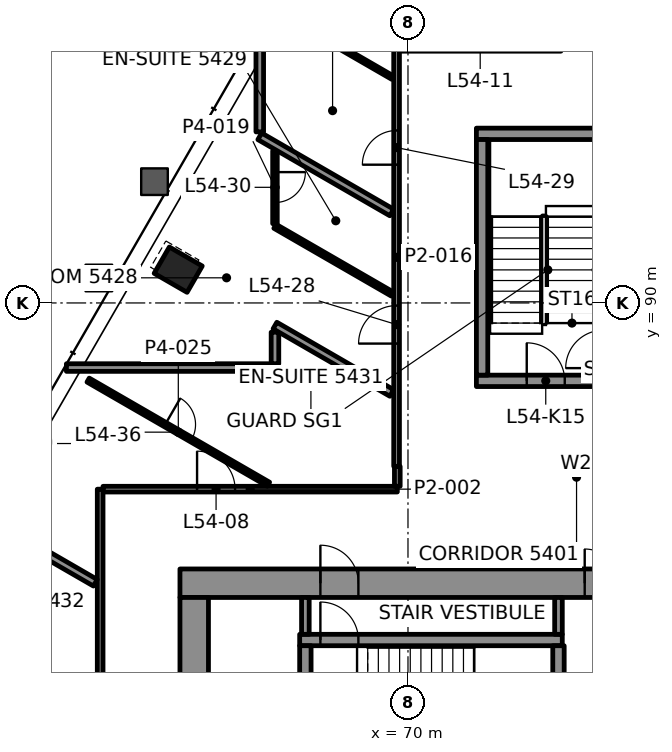
"""IFC4 building model, lengths in metres.
Left out: names, types, materials, properties, quantities, classifications, styles, units other than length and angle.
Written with IfcOpenShell. Run it as: python <this file> out.ifc"""

import sys

from ifc_helpers import new_model, si_unit, direction, frame, frame_2d, origin, origin_2d, place, context, subcontext, project, spatial, rectangle, hollow_rectangle, extrude, element, fill, save


model = new_model("IFC4")
c1 = context("Model", 3, precision=1e-05, world=origin(), true_north=direction((0.0, 1.0)))
c2 = subcontext(c1, "Body", "Model", "MODEL_VIEW")
j1 = project(units=[si_unit("LENGTHUNIT", "METRE"), si_unit("PLANEANGLEUNIT", "RADIAN")], contexts=[c1])
p1 = place(None, origin())
s1 = spatial("IfcSite", under=j1, at=p1, CompositionType="ELEMENT")
p2 = place(p1, origin())
s2 = spatial("IfcBuilding", under=s1, at=p2, CompositionType="ELEMENT")
p3 = place(p2, frame((0.0, 0.0, 229.9)))
s3 = spatial("IfcBuildingStorey", under=s2, at=p3, CompositionType="ELEMENT", Elevation=229.9)
p4 = place(p3, frame((63.954, 90.875, -0.0), z_axis=(0.0, 0.0, 1.0), x_axis=(-0.5, -0.866025403784, 0.0)))
e1 = element("IfcColumn", 1, at=p4, inside=s3, PredefinedType="COLUMN", context=c2, shape_type="SweptSolid", body=[
    extrude(hollow_rectangle(XDim=0.8, YDim=1.0, WallThickness=0.05, at=origin_2d()), origin(), (0.0, 0.0, 1.0), 3.9),
])
p5 = place(p3, frame((64.0, 82.625, 0.0), z_axis=(0.0, 0.0, 1.0), x_axis=(1.0, 0.0, 0.0)))
e2 = element("IfcWall", 2, at=p5, inside=s3, PredefinedType="SHEAR", context=c2, shape_type="SweptSolid", body=[
    extrude(rectangle(XDim=22.0, YDim=0.75, at=frame_2d((11.0, 0.0))), origin(), (0.0, 0.0, 1.0), 3.7),
])
p6 = place(p5, frame((3.695, 0.0, 0.0)))
e3 = element("IfcOpeningElement", 3, at=p6, cuts=e2, PredefinedType="OPENING", context=c2, shape_type="SweptSolid", body=[
    extrude(rectangle(XDim=1.0, YDim=2.1, at=frame_2d((0.5, 1.05))), frame((0.0, 0.385, 0.0), z_axis=(0.0, -1.0, 0.0), x_axis=(1.0, 0.0, 0.0)), (0.0, 0.0, 1.0), 0.77),
])
p7 = place(p5, frame((17.505, 0.0, 0.0)))
e4 = element("IfcOpeningElement", 4, at=p7, cuts=e2, PredefinedType="OPENING", context=c2, shape_type="SweptSolid", body=[
    extrude(rectangle(XDim=1.0, YDim=2.1, at=frame_2d((0.5, 1.05))), frame((0.0, 0.385, 0.0), z_axis=(0.0, -1.0, 0.0), x_axis=(1.0, 0.0, 0.0)), (0.0, 0.0, 1.0), 0.77),
])
p8 = place(p5, frame((10.65, 0.0, 0.0)))
e5 = element("IfcOpeningElement", 5, at=p8, cuts=e2, PredefinedType="OPENING", context=c2, shape_type="SweptSolid", body=[
    extrude(rectangle(XDim=0.9, YDim=2.1, at=frame_2d((0.45, 1.05))), frame((0.0, 0.385, 0.0), z_axis=(0.0, -1.0, 0.0), x_axis=(1.0, 0.0, 0.0)), (0.0, 0.0, 1.0), 0.77),
])
p9 = place(p3, frame((64.375, 67.75, 0.0), z_axis=(0.0, 0.0, 1.0), x_axis=(0.0, 1.0, 0.0)))
e6 = element("IfcWall", 6, at=p9, inside=s3, PredefinedType="SHEAR", context=c2, shape_type="SweptSolid", body=[
    extrude(rectangle(XDim=14.5, YDim=0.75, at=frame_2d((7.25, 0.0))), origin(), (0.0, 0.0, 1.0), 3.7),
])
p10 = place(p9, frame((4.65, 0.0, 0.0)))
e7 = element("IfcOpeningElement", 7, at=p10, cuts=e6, PredefinedType="OPENING", context=c2, shape_type="SweptSolid", body=[
    extrude(rectangle(XDim=1.8, YDim=2.1, at=frame_2d((0.9, 1.05))), frame((0.0, 0.385, 0.0), z_axis=(0.0, -1.0, 0.0), x_axis=(1.0, 0.0, 0.0)), (0.0, 0.0, 1.0), 0.77),
])
p11 = place(p9, frame((2.55, 0.0, 0.0)))
e8 = element("IfcOpeningElement", 8, at=p11, cuts=e6, PredefinedType="OPENING", context=c2, shape_type="SweptSolid", body=[
    extrude(rectangle(XDim=0.9, YDim=2.1, at=frame_2d((0.45, 1.05))), frame((0.0, 0.385, 0.0), z_axis=(0.0, -1.0, 0.0), x_axis=(1.0, 0.0, 0.0)), (0.0, 0.0, 1.0), 0.77),
])
p12 = place(p9, frame((10.35, 0.0, 0.0)))
e9 = element("IfcOpeningElement", 9, at=p12, cuts=e6, PredefinedType="OPENING", context=c2, shape_type="SweptSolid", body=[
    extrude(rectangle(XDim=0.9, YDim=2.1, at=frame_2d((0.45, 1.05))), frame((0.0, 0.385, 0.0), z_axis=(0.0, -1.0, 0.0), x_axis=(1.0, 0.0, 0.0)), (0.0, 0.0, 1.0), 0.77),
])
p13 = place(p3, frame((67.15, 81.13, 0.0), z_axis=(0.0, 0.0, 1.0), x_axis=(1.0, 0.0, 0.0)))
e10 = element("IfcWall", 10, at=p13, inside=s3, PredefinedType="SHEAR", context=c2, shape_type="SweptSolid", body=[
    extrude(rectangle(XDim=6.91, YDim=0.3, at=frame_2d((3.455, 0.0))), origin(), (0.0, 0.0, 1.0), 3.7),
])
p14 = place(p13, frame((0.545, 0.0, 0.0)))
e11 = element("IfcOpeningElement", 11, at=p14, cuts=e10, PredefinedType="OPENING", context=c2, shape_type="SweptSolid", body=[
    extrude(rectangle(XDim=1.0, YDim=2.1, at=frame_2d((0.5, 1.05))), frame((0.0, 0.16, 0.0), z_axis=(0.0, -1.0, 0.0), x_axis=(1.0, 0.0, 0.0)), (0.0, 0.0, 1.0), 0.32),
])
for number, where, z_axis, x_axis in (
    (12, (67.3, 77.9, 0.0), (0.0, 0.0, 1.0), (0.0, 1.0, 0.0)),
    (13, (73.96, 77.9, 0.0), (0.0, 0.0, 1.0), (0.0, 1.0, 0.0)),
):
    element("IfcWall", number, at=place(p3, frame(where, z_axis=z_axis, x_axis=x_axis)), inside=s3, PredefinedType="SHEAR", context=c2, shape_type="SweptSolid", body=[
        extrude(rectangle(XDim=3.08, YDim=0.3, at=frame_2d((1.54, 0.0))), origin(), (0.0, 0.0, 1.0), 3.7),
    ])
p15 = place(p3, frame((71.8, 87.95, 0.0), z_axis=(0.0, 0.0, 1.0), x_axis=(1.0, 0.0, 0.0)))
e14 = element("IfcWall", 14, at=p15, inside=s3, PredefinedType="SHEAR", context=c2, shape_type="SweptSolid", body=[
    extrude(rectangle(XDim=6.4, YDim=0.3, at=frame_2d((3.2, 0.0))), origin(), (0.0, 0.0, 1.0), 3.7),
])
p16 = place(p15, frame((1.325, 0.0, 0.0)))
e15 = element("IfcOpeningElement", 15, at=p16, cuts=e14, PredefinedType="OPENING", context=c2, shape_type="SweptSolid", body=[
    extrude(rectangle(XDim=1.0, YDim=2.1, at=frame_2d((0.5, 1.05))), frame((0.0, 0.16, 0.0), z_axis=(0.0, -1.0, 0.0), x_axis=(1.0, 0.0, 0.0)), (0.0, 0.0, 1.0), 0.32),
])
p17 = place(p15, frame((4.125, 0.0, 0.0)))
e16 = element("IfcOpeningElement", 16, at=p17, cuts=e14, PredefinedType="OPENING", context=c2, shape_type="SweptSolid", body=[
    extrude(rectangle(XDim=1.2, YDim=2.1, at=frame_2d((0.6, 1.05))), frame((0.0, 0.16, 0.0), z_axis=(0.0, -1.0, 0.0), x_axis=(1.0, 0.0, 0.0)), (0.0, 0.0, 1.0), 0.32),
])
p18 = place(p3, frame((71.8, 94.45, 0.0), z_axis=(0.0, 0.0, 1.0), x_axis=(1.0, 0.0, 0.0)))
e17 = element("IfcWall", 17, at=p18, inside=s3, PredefinedType="SHEAR", context=c2, shape_type="SweptSolid", body=[
    extrude(rectangle(XDim=6.4, YDim=0.3, at=frame_2d((3.2, 0.0))), origin(), (0.0, 0.0, 1.0), 3.7),
])
p19 = place(p3, frame((71.95, 88.1, 0.0), z_axis=(0.0, 0.0, 1.0), x_axis=(0.0, 1.0, 0.0)))
e18 = element("IfcWall", 18, at=p19, inside=s3, PredefinedType="SHEAR", context=c2, shape_type="SweptSolid", body=[
    extrude(rectangle(XDim=6.2, YDim=0.3, at=frame_2d((3.1, 0.0))), origin(), (0.0, 0.0, 1.0), 3.7),
])
p20 = place(p3, frame((61.976, 85.1, 0.0), z_axis=(0.0, 0.0, 1.0), x_axis=(1.0, 0.0, 0.0)))
e19 = element("IfcWall", 19, at=p20, inside=s3, PredefinedType="PARTITIONING", context=c2, shape_type="SweptSolid", body=[
    extrude(rectangle(XDim=7.744, YDim=0.15, at=frame_2d((3.872, 0.0))), origin(), (0.0, 0.0, 1.0), 3.1),
])
p21 = place(p20, frame((2.475, 0.0, 0.0)))
e20 = element("IfcOpeningElement", 20, at=p21, cuts=e19, PredefinedType="OPENING", context=c2, shape_type="SweptSolid", body=[
    extrude(rectangle(XDim=1.0, YDim=2.1, at=frame_2d((0.5, 1.05))), frame((0.0, 0.085, 0.0), z_axis=(0.0, -1.0, 0.0), x_axis=(1.0, 0.0, 0.0)), (0.0, 0.0, 1.0), 0.17),
])
p22 = place(p3, frame((61.012, 88.3, 0.0), z_axis=(0.0, 0.0, 1.0), x_axis=(1.0, 0.0, 0.0)))
e21 = element("IfcWall", 21, at=p22, inside=s3, PredefinedType="PARTITIONING", context=c2, shape_type="SweptSolid", body=[
    extrude(rectangle(XDim=5.488, YDim=0.2, at=frame_2d((2.744, 0.0))), origin(), (0.0, 0.0, 1.0), 3.022),
])
p23 = place(p3, frame((69.719, 85.175, 0.0), z_axis=(0.0, 0.0, 1.0), x_axis=(0.0, 1.0, 0.0)))
e22 = element("IfcWall", 22, at=p23, inside=s3, PredefinedType="PARTITIONING", context=c2, shape_type="SweptSolid", body=[
    extrude(rectangle(XDim=0.525, YDim=0.15, at=frame_2d((0.262, 0.0))), origin(), (0.0, 0.0, 1.0), 3.1),
])
p24 = place(p3, frame((69.7, 85.7, 0.0), z_axis=(0.0, 0.0, 1.0), x_axis=(0.0, 1.0, 0.0)))
e23 = element("IfcWall", 23, at=p24, inside=s3, PredefinedType="PARTITIONING", context=c2, shape_type="SweptSolid", body=[
    extrude(rectangle(XDim=10.999, YDim=0.15, at=frame_2d((5.5, 0.0))), origin(), (0.0, 0.0, 1.0), 3.1),
])
p25 = place(p24, frame((3.23, 0.0, 0.0)))
e24 = element("IfcOpeningElement", 24, at=p25, cuts=e23, PredefinedType="OPENING", context=c2, shape_type="SweptSolid", body=[
    extrude(rectangle(XDim=1.0, YDim=2.1, at=frame_2d((0.5, 1.05))), frame((0.0, 0.085, 0.0), z_axis=(0.0, -1.0, 0.0), x_axis=(1.0, 0.0, 0.0)), (0.0, 0.0, 1.0), 0.17),
])
p26 = place(p24, frame((7.938, 0.0, 0.0)))
e25 = element("IfcOpeningElement", 25, at=p26, cuts=e23, PredefinedType="OPENING", context=c2, shape_type="SweptSolid", body=[
    extrude(rectangle(XDim=0.9, YDim=2.1, at=frame_2d((0.45, 1.05))), frame((0.0, 0.085, 0.0), z_axis=(0.0, -1.0, 0.0), x_axis=(1.0, 0.0, 0.0)), (0.0, 0.0, 1.0), 0.17),
])
p27 = place(p3, frame((66.5, 88.4, 0.0), z_axis=(0.0, 0.0, 1.0), x_axis=(0.0, 1.0, 0.0)))
e26 = element("IfcWall", 26, at=p27, inside=s3, PredefinedType="PARTITIONING", context=c2, shape_type="SweptSolid", body=[
    extrude(rectangle(XDim=0.83, YDim=0.2, at=frame_2d((0.415, 0.0))), origin(), (0.0, 0.0, 1.0), 3.1),
])
p28 = place(p3, frame((66.5, 93.999, 0.0), z_axis=(0.0, 0.0, 1.0), x_axis=(0.0, -1.0, 0.0)))
e27 = element("IfcWall", 27, at=p28, inside=s3, PredefinedType="PARTITIONING", context=c2, shape_type="SweptSolid", body=[
    extrude(rectangle(XDim=1.912, YDim=0.12, at=frame_2d((0.956, 0.0))), origin(), (0.0, 0.0, 1.0), 3.1),
])
p29 = place(p28, frame((0.556, 0.0, 0.0)))
e28 = element("IfcOpeningElement", 28, at=p29, cuts=e27, PredefinedType="OPENING", context=c2, shape_type="SweptSolid", body=[
    extrude(rectangle(XDim=0.8, YDim=2.1, at=frame_2d((0.4, 1.05))), frame((0.0, 0.07, 0.0), z_axis=(0.0, -1.0, 0.0), x_axis=(1.0, 0.0, 0.0)), (0.0, 0.0, 1.0), 0.14),
])
p30 = place(p3, frame((66.1, 94.502, 0.0), z_axis=(0.0, 0.0, 1.0), x_axis=(0.0, 1.0, 0.0)))
e29 = element("IfcWall", 29, at=p30, inside=s3, PredefinedType="PARTITIONING", context=c2, shape_type="SweptSolid", body=[
    extrude(rectangle(XDim=2.611, YDim=0.2, at=frame_2d((1.306, 0.0))), origin(), (0.0, 0.0, 1.0), 3.022),
])
p31 = place(p3, frame((61.9, 68.476, 0.0), z_axis=(0.0, 0.0, 1.0), x_axis=(0.0, 1.0, 0.0)))
e30 = element("IfcWall", 30, at=p31, inside=s3, PredefinedType="PARTITIONING", context=c2, shape_type="SweptSolid", body=[
    extrude(rectangle(XDim=16.624, YDim=0.15, at=frame_2d((8.312, 0.0))), origin(), (0.0, 0.0, 1.0), 3.1),
])
p32 = place(p31, frame((1.946, 0.0, 0.0)))
e31 = element("IfcOpeningElement", 31, at=p32, cuts=e30, PredefinedType="OPENING", context=c2, shape_type="SweptSolid", body=[
    extrude(rectangle(XDim=0.9, YDim=2.1, at=frame_2d((0.45, 1.05))), frame((0.0, 0.085, 0.0), z_axis=(0.0, -1.0, 0.0), x_axis=(1.0, 0.0, 0.0)), (0.0, 0.0, 1.0), 0.17),
])
p33 = place(p31, frame((10.263, 0.0, 0.0)))
e32 = element("IfcOpeningElement", 32, at=p33, cuts=e30, PredefinedType="OPENING", context=c2, shape_type="SweptSolid", body=[
    extrude(rectangle(XDim=1.0, YDim=2.1, at=frame_2d((0.5, 1.05))), frame((0.0, 0.085, 0.0), z_axis=(0.0, -1.0, 0.0), x_axis=(1.0, 0.0, 0.0)), (0.0, 0.0, 1.0), 0.17),
])
p34 = place(p3, frame((69.599, 95.927, 0.0), z_axis=(0.0, 0.0, 1.0), x_axis=(-0.866028486751, 0.499994660107, 0.0)))
e33 = element("IfcWall", 33, at=p34, inside=s3, PredefinedType="PARTITIONING", context=c2, shape_type="SweptSolid", body=[
    extrude(rectangle(XDim=3.623, YDim=0.1, at=frame_2d((1.812, 0.0))), origin(), (0.0, 0.0, 1.0), 3.022),
])
p35 = place(p3, frame((69.573, 92.38, 0.0), z_axis=(0.0, 0.0, 1.0), x_axis=(-0.866020331166, 0.500008785931, 0.0)))
e34 = element("IfcWall", 34, at=p35, inside=s3, PredefinedType="PARTITIONING", context=c2, shape_type="SweptSolid", body=[
    extrude(rectangle(XDim=4.01, YDim=0.2, at=frame_2d((2.005, 0.0))), origin(), (0.0, 0.0, 1.0), 3.022),
])
p36 = place(p3, frame((69.59, 90.233, 0.0), z_axis=(0.0, 0.0, 1.0), x_axis=(-0.866028357664, 0.499994883695, 0.0)))
e35 = element("IfcWall", 35, at=p36, inside=s3, PredefinedType="PARTITIONING", context=c2, shape_type="SweptSolid", body=[
    extrude(rectangle(XDim=3.568, YDim=0.12, at=frame_2d((1.784, 0.0))), origin(), (0.0, 0.0, 1.0), 3.1),
])
p37 = place(p3, frame((69.573, 87.631, 0.0), z_axis=(0.0, 0.0, 1.0), x_axis=(-0.866028616566, 0.499994435258, 0.0)))
e36 = element("IfcWall", 36, at=p37, inside=s3, PredefinedType="PARTITIONING", context=c2, shape_type="SweptSolid", body=[
    extrude(rectangle(XDim=3.548, YDim=0.2, at=frame_2d((1.774, 0.0))), origin(), (0.0, 0.0, 1.0), 3.1),
])
p38 = place(p3, frame((61.583, 87.97, 0.0), z_axis=(0.0, 0.0, 1.0), x_axis=(0.866027562125, -0.499996261625, 0.0)))
e37 = element("IfcWall", 37, at=p38, inside=s3, PredefinedType="PARTITIONING", context=c2, shape_type="SweptSolid", body=[
    extrude(rectangle(XDim=5.48, YDim=0.12, at=frame_2d((2.74, 0.0))), origin(), (0.0, 0.0, 1.0), 3.022),
])
p39 = place(p38, frame((2.34, 0.0, 0.0)))
e38 = element("IfcOpeningElement", 38, at=p39, cuts=e37, PredefinedType="OPENING", context=c2, shape_type="SweptSolid", body=[
    extrude(rectangle(XDim=0.8, YDim=2.1, at=frame_2d((0.4, 1.05))), frame((0.0, 0.07, 0.0), z_axis=(0.0, -1.0, 0.0), x_axis=(1.0, 0.0, 0.0)), (0.0, 0.0, 1.0), 0.14),
])
p40 = place(p3, frame((61.773, 82.637, 0.0), z_axis=(0.0, 0.0, 1.0), x_axis=(-0.866082241464, 0.499901541327, 0.0)))
e39 = element("IfcWall", 39, at=p40, inside=s3, PredefinedType="PARTITIONING", context=c2, shape_type="SweptSolid", body=[
    extrude(rectangle(XDim=1.731, YDim=0.2, at=frame_2d((0.865, 0.0))), origin(), (0.0, 0.0, 1.0), 3.1),
])
for number, where, z_axis, x_axis in (
    (40, (67.3, 81.28, 0.0), (0.0, 0.0, 1.0), (0.0, 1.0, 0.0)),
    (41, (73.96, 81.28, 0.0), (0.0, 0.0, 1.0), (0.0, 1.0, 0.0)),
):
    element("IfcWall", number, at=place(p3, frame(where, z_axis=z_axis, x_axis=x_axis)), inside=s3, PredefinedType="PARTITIONING", context=c2, shape_type="SweptSolid", body=[
        extrude(rectangle(XDim=0.97, YDim=0.2, at=frame_2d((0.485, 0.0))), origin(), (0.0, 0.0, 1.0), 3.7),
    ])
p41 = place(p21, origin())
e42 = element("IfcDoor", 42, at=p41, inside=s3, OperationType="SINGLE_SWING_LEFT", PredefinedType="DOOR", context=c2, shape_type="SweptSolid", body=[
    extrude(rectangle(XDim=1.0, YDim=2.1, at=frame_2d((0.5, 1.05))), frame((0.0, 0.025, 0.0), z_axis=(0.0, -1.0, 0.0), x_axis=(1.0, 0.0, 0.0)), (0.0, 0.0, 1.0), 0.05),
])
fill(e20, e42)
p42 = place(p25, origin())
e43 = element("IfcDoor", 43, at=p42, inside=s3, OperationType="SINGLE_SWING_LEFT", PredefinedType="DOOR", context=c2, shape_type="SweptSolid", body=[
    extrude(rectangle(XDim=1.0, YDim=2.1, at=frame_2d((0.5, 1.05))), frame((0.0, 0.025, 0.0), z_axis=(0.0, -1.0, 0.0), x_axis=(1.0, 0.0, 0.0)), (0.0, 0.0, 1.0), 0.05),
])
fill(e24, e43)
p43 = place(p26, origin())
e44 = element("IfcDoor", 44, at=p43, inside=s3, OperationType="SINGLE_SWING_RIGHT", PredefinedType="DOOR", context=c2, shape_type="SweptSolid", body=[
    extrude(rectangle(XDim=0.9, YDim=2.1, at=frame_2d((0.45, 1.05))), frame((0.0, 0.025, 0.0), z_axis=(0.0, -1.0, 0.0), x_axis=(1.0, 0.0, 0.0)), (0.0, 0.0, 1.0), 0.05),
])
fill(e25, e44)
p44 = place(p29, origin())
e45 = element("IfcDoor", 45, at=p44, inside=s3, OperationType="SINGLE_SWING_LEFT", PredefinedType="DOOR", context=c2, shape_type="SweptSolid", body=[
    extrude(rectangle(XDim=0.8, YDim=2.1, at=frame_2d((0.4, 1.05))), frame((0.0, 0.025, 0.0), z_axis=(0.0, -1.0, 0.0), x_axis=(1.0, 0.0, 0.0)), (0.0, 0.0, 1.0), 0.05),
])
fill(e28, e45)
p45 = place(p39, origin())
e46 = element("IfcDoor", 46, at=p45, inside=s3, OperationType="SINGLE_SWING_LEFT", PredefinedType="DOOR", context=c2, shape_type="SweptSolid", body=[
    extrude(rectangle(XDim=0.8, YDim=2.1, at=frame_2d((0.4, 1.05))), frame((0.0, 0.025, 0.0), z_axis=(0.0, -1.0, 0.0), x_axis=(1.0, 0.0, 0.0)), (0.0, 0.0, 1.0), 0.05),
])
fill(e38, e46)
p46 = place(p14, origin())
e47 = element("IfcDoor", 47, at=p46, inside=s3, OperationType="SINGLE_SWING_RIGHT", PredefinedType="DOOR", context=c2, shape_type="SweptSolid", body=[
    extrude(rectangle(XDim=1.0, YDim=2.1, at=frame_2d((0.5, 1.05))), frame((0.0, 0.025, 0.0), z_axis=(0.0, -1.0, 0.0), x_axis=(1.0, 0.0, 0.0)), (0.0, 0.0, 1.0), 0.05),
])
fill(e11, e47)
p47 = place(p6, origin())
e48 = element("IfcDoor", 48, at=p47, inside=s3, OperationType="SINGLE_SWING_LEFT", PredefinedType="DOOR", context=c2, shape_type="SweptSolid", body=[
    extrude(rectangle(XDim=1.0, YDim=2.1, at=frame_2d((0.5, 1.05))), frame((0.0, 0.095, 0.0), z_axis=(0.0, -1.0, 0.0), x_axis=(1.0, 0.0, 0.0)), (0.0, 0.0, 1.0), 0.19),
])
fill(e3, e48)
p48 = place(p16, origin())
e49 = element("IfcDoor", 49, at=p48, inside=s3, OperationType="SINGLE_SWING_RIGHT", PredefinedType="DOOR", context=c2, shape_type="SweptSolid", body=[
    extrude(rectangle(XDim=1.0, YDim=2.1, at=frame_2d((0.5, 1.05))), frame((0.0, 0.025, 0.0), z_axis=(0.0, -1.0, 0.0), x_axis=(1.0, 0.0, 0.0)), (0.0, 0.0, 1.0), 0.05),
])
fill(e15, e49)
p49 = place(p8, origin())
e50 = element("IfcDoor", 50, at=p49, inside=s3, OperationType="SINGLE_SWING_LEFT", PredefinedType="DOOR", context=c2, shape_type="SweptSolid", body=[
    extrude(rectangle(XDim=0.9, YDim=2.1, at=frame_2d((0.45, 1.05))), frame((0.0, 0.095, 0.0), z_axis=(0.0, -1.0, 0.0), x_axis=(1.0, 0.0, 0.0)), (0.0, 0.0, 1.0), 0.19),
])
fill(e5, e50)
save(model, sys.argv[1])
